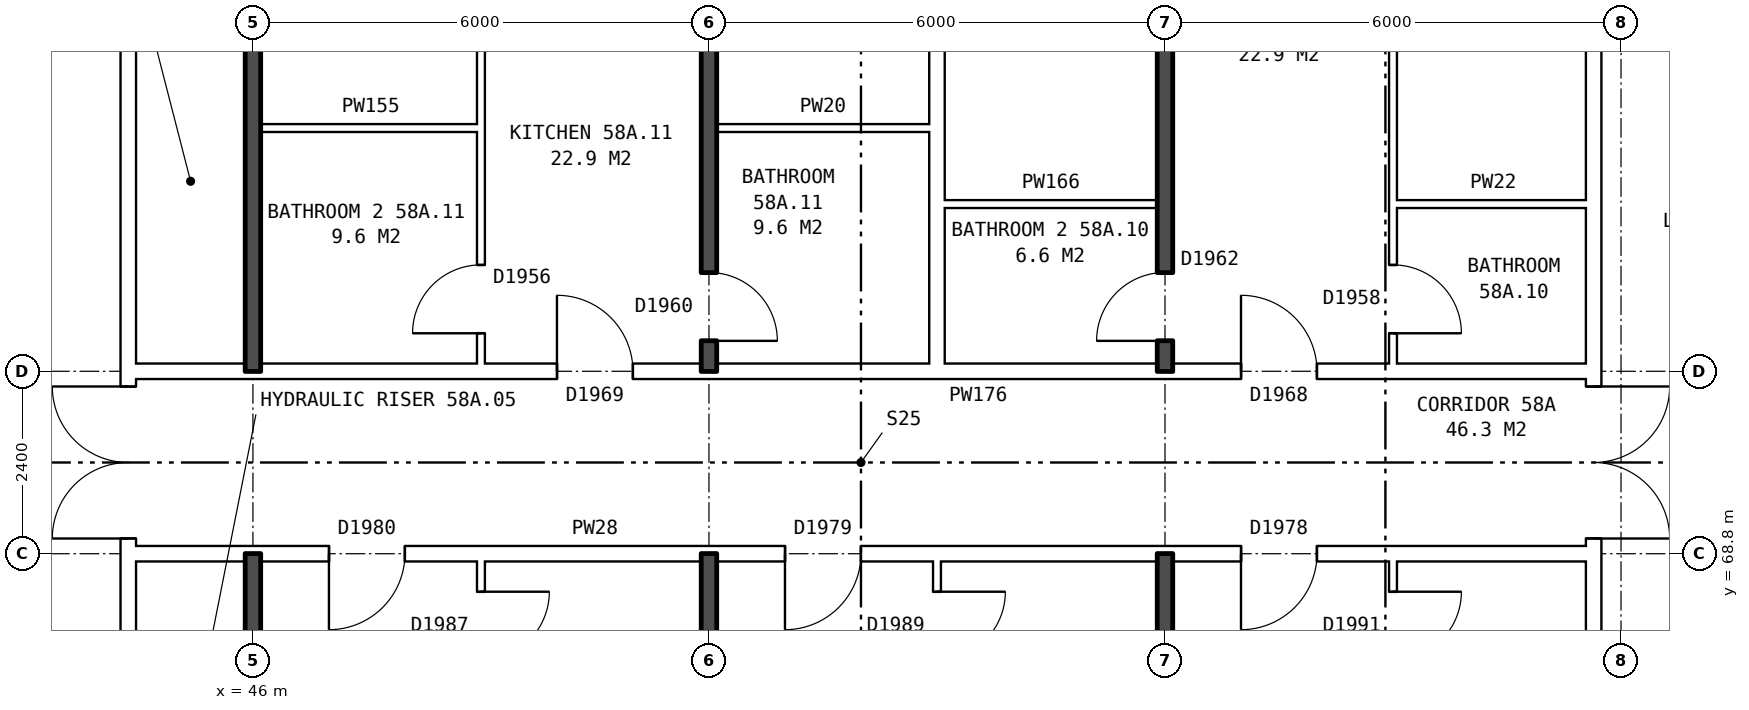
"""IFC4 building model, lengths in metres.
Left out: names, types, materials, properties, quantities, classifications, styles, units other than length and angle.
Written with IfcOpenShell. Run it as: python <this file> out.ifc"""

import sys

from ifc_helpers import new_model, si_unit, direction, frame, frame_2d, origin, place, context, subcontext, project, spatial, rectangle, extrude, element, fill, save


model = new_model("IFC4")
c1 = context("Model", 3, precision=1e-05, world=origin(), true_north=direction((0.0, 1.0)))
c2 = subcontext(c1, "Body", "Model", "MODEL_VIEW")
j1 = project(units=[si_unit("LENGTHUNIT", "METRE"), si_unit("PLANEANGLEUNIT", "RADIAN")], contexts=[c1])
p1 = place(None, origin())
s1 = spatial("IfcSite", under=j1, at=p1, CompositionType="ELEMENT")
p2 = place(p1, origin())
s2 = spatial("IfcBuilding", under=s1, at=p2, CompositionType="ELEMENT")
p3 = place(p2, frame((0.0, 0.0, 205.9)))
s3 = spatial("IfcBuildingStorey", under=s2, at=p3, CompositionType="ELEMENT", Elevation=205.9)
p4 = place(p3, frame((63.64, 63.9, 0.0), z_axis=(0.0, 0.0, 1.0), x_axis=(0.0, 1.0, 0.0)))
e1 = element("IfcWall", 1, at=p4, inside=s3, PredefinedType="PARTITIONING", context=c2, shape_type="SweptSolid", body=[
    extrude(rectangle(XDim=12.2, YDim=0.2, at=frame_2d((6.1, 0.0))), origin(), (0.0, 0.0, 1.0), 2.85),
])
p5 = place(p4, frame((5.1, 0.0, 0.0)))
e2 = element("IfcOpeningElement", 2, at=p5, cuts=e1, PredefinedType="OPENING", context=c2, shape_type="SweptSolid", body=[
    extrude(rectangle(XDim=2.0, YDim=2.1, at=frame_2d((1.0, 1.05))), frame((0.0, 0.11, 0.0), z_axis=(0.0, -1.0, 0.0), x_axis=(1.0, 0.0, 0.0)), (0.0, 0.0, 1.0), 0.22),
])
p6 = place(p3, frame((44.36, 63.9, 0.0), z_axis=(0.0, 0.0, 1.0), x_axis=(0.0, 1.0, 0.0)))
e3 = element("IfcWall", 3, at=p6, inside=s3, PredefinedType="PARTITIONING", context=c2, shape_type="SweptSolid", body=[
    extrude(rectangle(XDim=12.2, YDim=0.2, at=frame_2d((6.1, 0.0))), origin(), (0.0, 0.0, 1.0), 2.85),
])
p7 = place(p6, frame((5.1, 0.0, 0.0)))
e4 = element("IfcOpeningElement", 4, at=p7, cuts=e3, PredefinedType="OPENING", context=c2, shape_type="SweptSolid", body=[
    extrude(rectangle(XDim=2.0, YDim=2.1, at=frame_2d((1.0, 1.05))), frame((0.0, 0.11, 0.0), z_axis=(0.0, -1.0, 0.0), x_axis=(1.0, 0.0, 0.0)), (0.0, 0.0, 1.0), 0.22),
])
p8 = place(p3, frame((44.36, 68.8, 0.0), z_axis=(0.0, 0.0, 1.0), x_axis=(1.0, 0.0, 0.0)))
e5 = element("IfcWall", 5, at=p8, inside=s3, PredefinedType="PARTITIONING", context=c2, shape_type="SweptSolid", body=[
    extrude(rectangle(XDim=19.28, YDim=0.2, at=frame_2d((9.64, 0.0))), origin(), (0.0, 0.0, 1.0), 2.85),
])
p9 = place(p8, frame((14.64, 0.0, 0.0)))
e6 = element("IfcOpeningElement", 6, at=p9, cuts=e5, PredefinedType="OPENING", context=c2, shape_type="SweptSolid", body=[
    extrude(rectangle(XDim=1.0, YDim=2.1, at=frame_2d((0.5, 1.05))), frame((0.0, 0.11, 0.0), z_axis=(0.0, -1.0, 0.0), x_axis=(1.0, 0.0, 0.0)), (0.0, 0.0, 1.0), 0.22),
])
p10 = place(p8, frame((8.64, 0.0, 0.0)))
e7 = element("IfcOpeningElement", 7, at=p10, cuts=e5, PredefinedType="OPENING", context=c2, shape_type="SweptSolid", body=[
    extrude(rectangle(XDim=1.0, YDim=2.1, at=frame_2d((0.5, 1.05))), frame((0.0, 0.11, 0.0), z_axis=(0.0, -1.0, 0.0), x_axis=(1.0, 0.0, 0.0)), (0.0, 0.0, 1.0), 0.22),
])
p11 = place(p8, frame((2.64, 0.0, 0.0)))
e8 = element("IfcOpeningElement", 8, at=p11, cuts=e5, PredefinedType="OPENING", context=c2, shape_type="SweptSolid", body=[
    extrude(rectangle(XDim=1.0, YDim=2.1, at=frame_2d((0.5, 1.05))), frame((0.0, 0.11, 0.0), z_axis=(0.0, -1.0, 0.0), x_axis=(1.0, 0.0, 0.0)), (0.0, 0.0, 1.0), 0.22),
])
p12 = place(p3, frame((44.36, 71.2, 0.0), z_axis=(0.0, 0.0, 1.0), x_axis=(1.0, 0.0, 0.0)))
e9 = element("IfcWall", 9, at=p12, inside=s3, PredefinedType="PARTITIONING", context=c2, shape_type="SweptSolid", body=[
    extrude(rectangle(XDim=19.28, YDim=0.2, at=frame_2d((9.64, 0.0))), origin(), (0.0, 0.0, 1.0), 2.85),
])
p13 = place(p12, frame((14.64, 0.0, 0.0)))
e10 = element("IfcOpeningElement", 10, at=p13, cuts=e9, PredefinedType="OPENING", context=c2, shape_type="SweptSolid", body=[
    extrude(rectangle(XDim=1.0, YDim=2.1, at=frame_2d((0.5, 1.05))), frame((0.0, 0.11, 0.0), z_axis=(0.0, -1.0, 0.0), x_axis=(1.0, 0.0, 0.0)), (0.0, 0.0, 1.0), 0.22),
])
p14 = place(p12, frame((5.64, 0.0, 0.0)))
e11 = element("IfcOpeningElement", 11, at=p14, cuts=e9, PredefinedType="OPENING", context=c2, shape_type="SweptSolid", body=[
    extrude(rectangle(XDim=1.0, YDim=2.1, at=frame_2d((0.5, 1.05))), frame((0.0, 0.11, 0.0), z_axis=(0.0, -1.0, 0.0), x_axis=(1.0, 0.0, 0.0)), (0.0, 0.0, 1.0), 0.22),
])
p15 = place(p3, frame((55.1, 73.4, 0.0), z_axis=(0.0, 0.0, 1.0), x_axis=(1.0, 0.0, 0.0)))
e12 = element("IfcWall", 12, at=p15, inside=s3, PredefinedType="PARTITIONING", context=c2, shape_type="SweptSolid", body=[
    extrude(rectangle(XDim=2.8, YDim=0.1, at=frame_2d((1.4, 0.0))), origin(), (0.0, 0.0, 1.0), 2.85),
])
p16 = place(p3, frame((61.0, 73.4, 0.0), z_axis=(0.0, 0.0, 1.0), x_axis=(1.0, 0.0, 0.0)))
e13 = element("IfcWall", 13, at=p16, inside=s3, PredefinedType="PARTITIONING", context=c2, shape_type="SweptSolid", body=[
    extrude(rectangle(XDim=2.64, YDim=0.1, at=frame_2d((1.32, 0.0))), origin(), (0.0, 0.0, 1.0), 2.85),
])
p17 = place(p3, frame((46.1, 74.4, 0.0), z_axis=(0.0, 0.0, 1.0), x_axis=(1.0, 0.0, 0.0)))
e14 = element("IfcWall", 14, at=p17, inside=s3, PredefinedType="PARTITIONING", context=c2, shape_type="SweptSolid", body=[
    extrude(rectangle(XDim=2.9, YDim=0.1, at=frame_2d((1.45, 0.0))), origin(), (0.0, 0.0, 1.0), 2.85),
])
p18 = place(p3, frame((52.1, 74.4, 0.0), z_axis=(0.0, 0.0, 1.0), x_axis=(1.0, 0.0, 0.0)))
e15 = element("IfcWall", 15, at=p18, inside=s3, PredefinedType="PARTITIONING", context=c2, shape_type="SweptSolid", body=[
    extrude(rectangle(XDim=2.8, YDim=0.1, at=frame_2d((1.4, 0.0))), origin(), (0.0, 0.0, 1.0), 2.85),
])
for number, where, z_axis, x_axis in (
    (16, (46.0, 54.36, 0.0), (0.0, 0.0, 1.0), (0.0, 1.0, 0.0)),
    (17, (46.0, 71.2, 0.0), (0.0, 0.0, 1.0), (0.0, 1.0, 0.0)),
):
    element("IfcWall", number, at=place(p3, frame(where, z_axis=z_axis, x_axis=x_axis)), inside=s3, PredefinedType="SOLIDWALL", context=c2, shape_type="SweptSolid", body=[
        extrude(rectangle(XDim=14.44, YDim=0.2, at=frame_2d((7.22, 0.0))), origin(), (0.0, 0.0, 1.0), 2.85),
    ])
p19 = place(p3, frame((49.0, 54.36, 0.0), z_axis=(0.0, 0.0, 1.0), x_axis=(0.0, 1.0, 0.0)))
e18 = element("IfcWall", 18, at=p19, inside=s3, PredefinedType="PARTITIONING", context=c2, shape_type="SweptSolid", body=[
    extrude(rectangle(XDim=14.34, YDim=0.1, at=frame_2d((7.17, 0.0))), origin(), (0.0, 0.0, 1.0), 2.85),
])
p20 = place(p19, frame((4.2, 0.0, 0.0)))
e19 = element("IfcOpeningElement", 19, at=p20, cuts=e18, PredefinedType="OPENING", context=c2, shape_type="SweptSolid", body=[
    extrude(rectangle(XDim=0.9, YDim=2.1, at=frame_2d((0.45, 1.05))), frame((0.0, 0.06, 0.0), z_axis=(0.0, -1.0, 0.0), x_axis=(1.0, 0.0, 0.0)), (0.0, 0.0, 1.0), 0.12),
])
p21 = place(p19, frame((13.04, 0.0, 0.0)))
e20 = element("IfcOpeningElement", 20, at=p21, cuts=e18, PredefinedType="OPENING", context=c2, shape_type="SweptSolid", body=[
    extrude(rectangle(XDim=0.9, YDim=2.1, at=frame_2d((0.45, 1.05))), frame((0.0, 0.06, 0.0), z_axis=(0.0, -1.0, 0.0), x_axis=(1.0, 0.0, 0.0)), (0.0, 0.0, 1.0), 0.12),
])
p22 = place(p3, frame((49.0, 71.3, 0.0), z_axis=(0.0, 0.0, 1.0), x_axis=(0.0, 1.0, 0.0)))
e21 = element("IfcWall", 21, at=p22, inside=s3, PredefinedType="PARTITIONING", context=c2, shape_type="SweptSolid", body=[
    extrude(rectangle(XDim=14.34, YDim=0.1, at=frame_2d((7.17, 0.0))), origin(), (0.0, 0.0, 1.0), 2.85),
])
p23 = place(p22, frame((7.94, 0.0, 0.0)))
e22 = element("IfcOpeningElement", 22, at=p23, cuts=e21, PredefinedType="OPENING", context=c2, shape_type="SweptSolid", body=[
    extrude(rectangle(XDim=0.9, YDim=2.1, at=frame_2d((0.45, 1.05))), frame((0.0, 0.06, 0.0), z_axis=(0.0, -1.0, 0.0), x_axis=(1.0, 0.0, 0.0)), (0.0, 0.0, 1.0), 0.12),
])
p24 = place(p22, frame((0.4, 0.0, 0.0)))
e23 = element("IfcOpeningElement", 23, at=p24, cuts=e21, PredefinedType="OPENING", context=c2, shape_type="SweptSolid", body=[
    extrude(rectangle(XDim=0.9, YDim=2.1, at=frame_2d((0.45, 1.05))), frame((0.0, 0.06, 0.0), z_axis=(0.0, -1.0, 0.0), x_axis=(1.0, 0.0, 0.0)), (0.0, 0.0, 1.0), 0.12),
])
p25 = place(p3, frame((52.0, 54.36, 0.0), z_axis=(0.0, 0.0, 1.0), x_axis=(0.0, 1.0, 0.0)))
e24 = element("IfcWall", 24, at=p25, inside=s3, PredefinedType="SOLIDWALL", context=c2, shape_type="SweptSolid", body=[
    extrude(rectangle(XDim=14.44, YDim=0.2, at=frame_2d((7.22, 0.0))), origin(), (0.0, 0.0, 1.0), 2.85),
])
p26 = place(p3, frame((52.0, 71.2, 0.0), z_axis=(0.0, 0.0, 1.0), x_axis=(0.0, 1.0, 0.0)))
e25 = element("IfcWall", 25, at=p26, inside=s3, PredefinedType="SOLIDWALL", context=c2, shape_type="SweptSolid", body=[
    extrude(rectangle(XDim=14.44, YDim=0.2, at=frame_2d((7.22, 0.0))), origin(), (0.0, 0.0, 1.0), 2.85),
])
p27 = place(p26, frame((8.04, 0.0, 0.0)))
e26 = element("IfcOpeningElement", 26, at=p27, cuts=e25, PredefinedType="OPENING", context=c2, shape_type="SweptSolid", body=[
    extrude(rectangle(XDim=0.9, YDim=2.1, at=frame_2d((0.45, 1.05))), frame((0.0, 0.11, 0.0), z_axis=(0.0, -1.0, 0.0), x_axis=(1.0, 0.0, 0.0)), (0.0, 0.0, 1.0), 0.22),
])
p28 = place(p26, frame((0.4, 0.0, 0.0)))
e27 = element("IfcOpeningElement", 27, at=p28, cuts=e25, PredefinedType="OPENING", context=c2, shape_type="SweptSolid", body=[
    extrude(rectangle(XDim=0.9, YDim=2.1, at=frame_2d((0.45, 1.05))), frame((0.0, 0.11, 0.0), z_axis=(0.0, -1.0, 0.0), x_axis=(1.0, 0.0, 0.0)), (0.0, 0.0, 1.0), 0.22),
])
p29 = place(p3, frame((55.0, 54.36, 0.0), z_axis=(0.0, 0.0, 1.0), x_axis=(0.0, 1.0, 0.0)))
e28 = element("IfcWall", 28, at=p29, inside=s3, PredefinedType="PARTITIONING", context=c2, shape_type="SweptSolid", body=[
    extrude(rectangle(XDim=14.34, YDim=0.1, at=frame_2d((7.17, 0.0))), origin(), (0.0, 0.0, 1.0), 2.85),
])
p30 = place(p29, frame((7.7, 0.0, 0.0)))
e29 = element("IfcOpeningElement", 29, at=p30, cuts=e28, PredefinedType="OPENING", context=c2, shape_type="SweptSolid", body=[
    extrude(rectangle(XDim=0.9, YDim=2.1, at=frame_2d((0.45, 1.05))), frame((0.0, 0.06, 0.0), z_axis=(0.0, -1.0, 0.0), x_axis=(1.0, 0.0, 0.0)), (0.0, 0.0, 1.0), 0.12),
])
p31 = place(p29, frame((13.04, 0.0, 0.0)))
e30 = element("IfcOpeningElement", 30, at=p31, cuts=e28, PredefinedType="OPENING", context=c2, shape_type="SweptSolid", body=[
    extrude(rectangle(XDim=0.9, YDim=2.1, at=frame_2d((0.45, 1.05))), frame((0.0, 0.06, 0.0), z_axis=(0.0, -1.0, 0.0), x_axis=(1.0, 0.0, 0.0)), (0.0, 0.0, 1.0), 0.12),
])
p32 = place(p3, frame((55.0, 71.3, 0.0), z_axis=(0.0, 0.0, 1.0), x_axis=(0.0, 1.0, 0.0)))
e31 = element("IfcWall", 31, at=p32, inside=s3, PredefinedType="PARTITIONING", context=c2, shape_type="SweptSolid", body=[
    extrude(rectangle(XDim=14.34, YDim=0.2, at=frame_2d((7.17, 0.0))), origin(), (0.0, 0.0, 1.0), 2.85),
])
p33 = place(p3, frame((58.0, 54.36, 0.0), z_axis=(0.0, 0.0, 1.0), x_axis=(0.0, 1.0, 0.0)))
e32 = element("IfcWall", 32, at=p33, inside=s3, PredefinedType="SOLIDWALL", context=c2, shape_type="SweptSolid", body=[
    extrude(rectangle(XDim=14.44, YDim=0.2, at=frame_2d((7.22, 0.0))), origin(), (0.0, 0.0, 1.0), 2.85),
])
p34 = place(p3, frame((58.0, 71.2, 0.0), z_axis=(0.0, 0.0, 1.0), x_axis=(0.0, 1.0, 0.0)))
e33 = element("IfcWall", 33, at=p34, inside=s3, PredefinedType="SOLIDWALL", context=c2, shape_type="SweptSolid", body=[
    extrude(rectangle(XDim=14.44, YDim=0.2, at=frame_2d((7.22, 0.0))), origin(), (0.0, 0.0, 1.0), 2.85),
])
p35 = place(p34, frame((8.04, 0.0, 0.0)))
e34 = element("IfcOpeningElement", 34, at=p35, cuts=e33, PredefinedType="OPENING", context=c2, shape_type="SweptSolid", body=[
    extrude(rectangle(XDim=0.9, YDim=2.1, at=frame_2d((0.45, 1.05))), frame((0.0, 0.11, 0.0), z_axis=(0.0, -1.0, 0.0), x_axis=(1.0, 0.0, 0.0)), (0.0, 0.0, 1.0), 0.22),
])
p36 = place(p34, frame((0.4, 0.0, 0.0)))
e35 = element("IfcOpeningElement", 35, at=p36, cuts=e33, PredefinedType="OPENING", context=c2, shape_type="SweptSolid", body=[
    extrude(rectangle(XDim=0.9, YDim=2.1, at=frame_2d((0.45, 1.05))), frame((0.0, 0.11, 0.0), z_axis=(0.0, -1.0, 0.0), x_axis=(1.0, 0.0, 0.0)), (0.0, 0.0, 1.0), 0.22),
])
p37 = place(p3, frame((61.0, 54.36, 0.0), z_axis=(0.0, 0.0, 1.0), x_axis=(0.0, 1.0, 0.0)))
e36 = element("IfcWall", 36, at=p37, inside=s3, PredefinedType="PARTITIONING", context=c2, shape_type="SweptSolid", body=[
    extrude(rectangle(XDim=14.34, YDim=0.1, at=frame_2d((7.17, 0.0))), origin(), (0.0, 0.0, 1.0), 2.85),
])
p38 = place(p37, frame((7.7, 0.0, 0.0)))
e37 = element("IfcOpeningElement", 37, at=p38, cuts=e36, PredefinedType="OPENING", context=c2, shape_type="SweptSolid", body=[
    extrude(rectangle(XDim=0.9, YDim=2.1, at=frame_2d((0.45, 1.05))), frame((0.0, 0.06, 0.0), z_axis=(0.0, -1.0, 0.0), x_axis=(1.0, 0.0, 0.0)), (0.0, 0.0, 1.0), 0.12),
])
p39 = place(p37, frame((13.04, 0.0, 0.0)))
e38 = element("IfcOpeningElement", 38, at=p39, cuts=e36, PredefinedType="OPENING", context=c2, shape_type="SweptSolid", body=[
    extrude(rectangle(XDim=0.9, YDim=2.1, at=frame_2d((0.45, 1.05))), frame((0.0, 0.06, 0.0), z_axis=(0.0, -1.0, 0.0), x_axis=(1.0, 0.0, 0.0)), (0.0, 0.0, 1.0), 0.12),
])
p40 = place(p3, frame((61.0, 71.3, 0.0), z_axis=(0.0, 0.0, 1.0), x_axis=(0.0, 1.0, 0.0)))
e39 = element("IfcWall", 39, at=p40, inside=s3, PredefinedType="PARTITIONING", context=c2, shape_type="SweptSolid", body=[
    extrude(rectangle(XDim=14.34, YDim=0.1, at=frame_2d((7.17, 0.0))), origin(), (0.0, 0.0, 1.0), 2.85),
])
p41 = place(p40, frame((7.94, 0.0, 0.0)))
e40 = element("IfcOpeningElement", 40, at=p41, cuts=e39, PredefinedType="OPENING", context=c2, shape_type="SweptSolid", body=[
    extrude(rectangle(XDim=0.9, YDim=2.1, at=frame_2d((0.45, 1.05))), frame((0.0, 0.06, 0.0), z_axis=(0.0, -1.0, 0.0), x_axis=(1.0, 0.0, 0.0)), (0.0, 0.0, 1.0), 0.12),
])
p42 = place(p40, frame((0.4, 0.0, 0.0)))
e41 = element("IfcOpeningElement", 41, at=p42, cuts=e39, PredefinedType="OPENING", context=c2, shape_type="SweptSolid", body=[
    extrude(rectangle(XDim=0.9, YDim=2.1, at=frame_2d((0.45, 1.05))), frame((0.0, 0.06, 0.0), z_axis=(0.0, -1.0, 0.0), x_axis=(1.0, 0.0, 0.0)), (0.0, 0.0, 1.0), 0.12),
])
p43 = place(p5, frame((2.0, 0.0, 0.0), z_axis=(0.0, 0.0, 1.0), x_axis=(-1.0, 0.0, 0.0)))
e42 = element("IfcDoor", 42, at=p43, inside=s3, OperationType="DOUBLE_DOOR_SINGLE_SWING", PredefinedType="DOOR", context=c2, shape_type="SweptSolid", body=[
    extrude(rectangle(XDim=2.0, YDim=2.1, at=frame_2d((1.0, 1.05))), frame((0.0, 0.025, 0.0), z_axis=(0.0, -1.0, 0.0), x_axis=(1.0, 0.0, 0.0)), (0.0, 0.0, 1.0), 0.05),
])
fill(e2, e42)
p44 = place(p7, origin())
e43 = element("IfcDoor", 43, at=p44, inside=s3, OperationType="DOUBLE_DOOR_SINGLE_SWING", PredefinedType="DOOR", context=c2, shape_type="SweptSolid", body=[
    extrude(rectangle(XDim=2.0, YDim=2.1, at=frame_2d((1.0, 1.05))), frame((0.0, 0.025, 0.0), z_axis=(0.0, -1.0, 0.0), x_axis=(1.0, 0.0, 0.0)), (0.0, 0.0, 1.0), 0.05),
])
fill(e4, e43)
p45 = place(p9, frame((1.0, 0.0, 0.0), z_axis=(0.0, 0.0, 1.0), x_axis=(-1.0, 0.0, 0.0)))
e44 = element("IfcDoor", 44, at=p45, inside=s3, OperationType="SINGLE_SWING_RIGHT", PredefinedType="DOOR", context=c2, shape_type="SweptSolid", body=[
    extrude(rectangle(XDim=1.0, YDim=2.1, at=frame_2d((0.5, 1.05))), frame((0.0, 0.025, 0.0), z_axis=(0.0, -1.0, 0.0), x_axis=(1.0, 0.0, 0.0)), (0.0, 0.0, 1.0), 0.05),
])
fill(e6, e44)
p46 = place(p39, frame((0.9, 0.0, 0.0), z_axis=(0.0, 0.0, 1.0), x_axis=(-1.0, 0.0, 0.0)))
e45 = element("IfcDoor", 45, at=p46, inside=s3, OperationType="SINGLE_SWING_LEFT", PredefinedType="DOOR", context=c2, shape_type="SweptSolid", body=[
    extrude(rectangle(XDim=0.9, YDim=2.1, at=frame_2d((0.45, 1.05))), frame((0.0, 0.025, 0.0), z_axis=(0.0, -1.0, 0.0), x_axis=(1.0, 0.0, 0.0)), (0.0, 0.0, 1.0), 0.05),
])
fill(e38, e45)
p47 = place(p10, frame((1.0, 0.0, 0.0), z_axis=(0.0, 0.0, 1.0), x_axis=(-1.0, 0.0, 0.0)))
e46 = element("IfcDoor", 46, at=p47, inside=s3, OperationType="SINGLE_SWING_RIGHT", PredefinedType="DOOR", context=c2, shape_type="SweptSolid", body=[
    extrude(rectangle(XDim=1.0, YDim=2.1, at=frame_2d((0.5, 1.05))), frame((0.0, 0.025, 0.0), z_axis=(0.0, -1.0, 0.0), x_axis=(1.0, 0.0, 0.0)), (0.0, 0.0, 1.0), 0.05),
])
fill(e7, e46)
p48 = place(p31, frame((0.9, 0.0, 0.0), z_axis=(0.0, 0.0, 1.0), x_axis=(-1.0, 0.0, 0.0)))
e47 = element("IfcDoor", 47, at=p48, inside=s3, OperationType="SINGLE_SWING_LEFT", PredefinedType="DOOR", context=c2, shape_type="SweptSolid", body=[
    extrude(rectangle(XDim=0.9, YDim=2.1, at=frame_2d((0.45, 1.05))), frame((0.0, 0.025, 0.0), z_axis=(0.0, -1.0, 0.0), x_axis=(1.0, 0.0, 0.0)), (0.0, 0.0, 1.0), 0.05),
])
fill(e30, e47)
p49 = place(p11, frame((1.0, 0.0, 0.0), z_axis=(0.0, 0.0, 1.0), x_axis=(-1.0, 0.0, 0.0)))
e48 = element("IfcDoor", 48, at=p49, inside=s3, OperationType="SINGLE_SWING_RIGHT", PredefinedType="DOOR", context=c2, shape_type="SweptSolid", body=[
    extrude(rectangle(XDim=1.0, YDim=2.1, at=frame_2d((0.5, 1.05))), frame((0.0, 0.025, 0.0), z_axis=(0.0, -1.0, 0.0), x_axis=(1.0, 0.0, 0.0)), (0.0, 0.0, 1.0), 0.05),
])
fill(e8, e48)
p50 = place(p21, frame((0.9, 0.0, 0.0), z_axis=(0.0, 0.0, 1.0), x_axis=(-1.0, 0.0, 0.0)))
e49 = element("IfcDoor", 49, at=p50, inside=s3, OperationType="SINGLE_SWING_LEFT", PredefinedType="DOOR", context=c2, shape_type="SweptSolid", body=[
    extrude(rectangle(XDim=0.9, YDim=2.1, at=frame_2d((0.45, 1.05))), frame((0.0, 0.025, 0.0), z_axis=(0.0, -1.0, 0.0), x_axis=(1.0, 0.0, 0.0)), (0.0, 0.0, 1.0), 0.05),
])
fill(e20, e49)
p51 = place(p13, origin())
e50 = element("IfcDoor", 50, at=p51, inside=s3, OperationType="SINGLE_SWING_LEFT", PredefinedType="DOOR", context=c2, shape_type="SweptSolid", body=[
    extrude(rectangle(XDim=1.0, YDim=2.1, at=frame_2d((0.5, 1.05))), frame((0.0, 0.025, 0.0), z_axis=(0.0, -1.0, 0.0), x_axis=(1.0, 0.0, 0.0)), (0.0, 0.0, 1.0), 0.05),
])
fill(e10, e50)
p52 = place(p42, frame((0.9, 0.0, 0.0), z_axis=(0.0, 0.0, 1.0), x_axis=(-1.0, 0.0, 0.0)))
e51 = element("IfcDoor", 51, at=p52, inside=s3, OperationType="SINGLE_SWING_RIGHT", PredefinedType="DOOR", context=c2, shape_type="SweptSolid", body=[
    extrude(rectangle(XDim=0.9, YDim=2.1, at=frame_2d((0.45, 1.05))), frame((0.0, 0.025, 0.0), z_axis=(0.0, -1.0, 0.0), x_axis=(1.0, 0.0, 0.0)), (0.0, 0.0, 1.0), 0.05),
])
fill(e41, e51)
p53 = place(p36, origin())
e52 = element("IfcDoor", 52, at=p53, inside=s3, OperationType="SINGLE_SWING_LEFT", PredefinedType="DOOR", context=c2, shape_type="SweptSolid", body=[
    extrude(rectangle(XDim=0.9, YDim=2.1, at=frame_2d((0.45, 1.05))), frame((0.0, 0.025, 0.0), z_axis=(0.0, -1.0, 0.0), x_axis=(1.0, 0.0, 0.0)), (0.0, 0.0, 1.0), 0.05),
])
fill(e35, e52)
p54 = place(p14, origin())
e53 = element("IfcDoor", 53, at=p54, inside=s3, OperationType="SINGLE_SWING_LEFT", PredefinedType="DOOR", context=c2, shape_type="SweptSolid", body=[
    extrude(rectangle(XDim=1.0, YDim=2.1, at=frame_2d((0.5, 1.05))), frame((0.0, 0.025, 0.0), z_axis=(0.0, -1.0, 0.0), x_axis=(1.0, 0.0, 0.0)), (0.0, 0.0, 1.0), 0.05),
])
fill(e11, e53)
p55 = place(p28, frame((0.9, 0.0, 0.0), z_axis=(0.0, 0.0, 1.0), x_axis=(-1.0, 0.0, 0.0)))
e54 = element("IfcDoor", 54, at=p55, inside=s3, OperationType="SINGLE_SWING_RIGHT", PredefinedType="DOOR", context=c2, shape_type="SweptSolid", body=[
    extrude(rectangle(XDim=0.9, YDim=2.1, at=frame_2d((0.45, 1.05))), frame((0.0, 0.025, 0.0), z_axis=(0.0, -1.0, 0.0), x_axis=(1.0, 0.0, 0.0)), (0.0, 0.0, 1.0), 0.05),
])
fill(e27, e54)
p56 = place(p24, origin())
e55 = element("IfcDoor", 55, at=p56, inside=s3, OperationType="SINGLE_SWING_LEFT", PredefinedType="DOOR", context=c2, shape_type="SweptSolid", body=[
    extrude(rectangle(XDim=0.9, YDim=2.1, at=frame_2d((0.45, 1.05))), frame((0.0, 0.025, 0.0), z_axis=(0.0, -1.0, 0.0), x_axis=(1.0, 0.0, 0.0)), (0.0, 0.0, 1.0), 0.05),
])
fill(e23, e55)
save(model, sys.argv[1])
